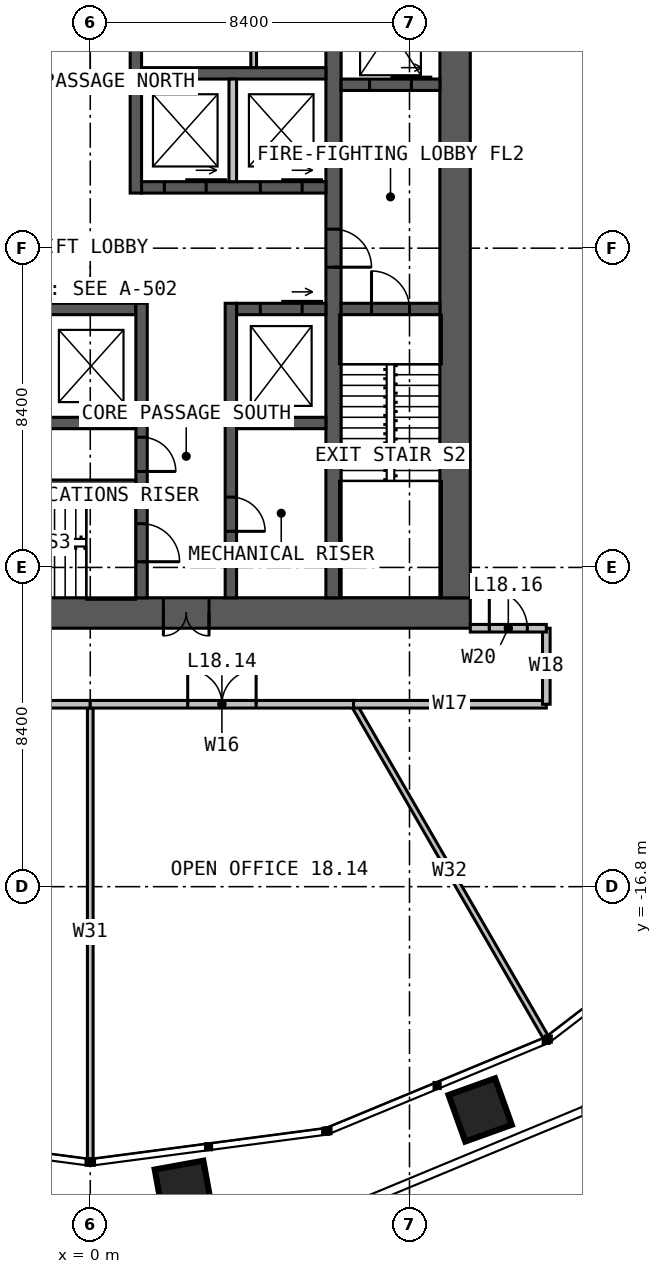
"""IFC4 building model, lengths in metres.
Left out: names, types, materials, properties, quantities, classifications, styles, units other than length and angle.
Written with IfcOpenShell. Run it as: python <this file> out.ifc"""

import sys

from ifc_helpers import new_model, si_unit, direction, frame, frame_2d, origin, place, context, subcontext, project, spatial, rectangle, extrude, element, fill, save


model = new_model("IFC4")
c1 = context("Model", 3, precision=1e-05, world=origin(), true_north=direction((0.0, 1.0)))
c2 = subcontext(c1, "Body", "Model", "MODEL_VIEW")
j1 = project(units=[si_unit("LENGTHUNIT", "METRE"), si_unit("PLANEANGLEUNIT", "RADIAN")], contexts=[c1])
p1 = place(None, origin())
s1 = spatial("IfcSite", under=j1, at=p1, CompositionType="ELEMENT")
p2 = place(p1, origin())
s2 = spatial("IfcBuilding", under=s1, at=p2, CompositionType="ELEMENT")
p3 = place(p2, frame((0.0, 0.0, 77.0)))
s3 = spatial("IfcBuildingStorey", under=s2, at=p3, CompositionType="ELEMENT", Elevation=77.0)
p4 = place(p3, frame((10.0, -9.6, 0.0), z_axis=(0.0, 0.0, 1.0), x_axis=(-1.0, 0.0, 0.0)))
e1 = element("IfcWall", 1, at=p4, inside=s3, PredefinedType="SOLIDWALL", context=c2, shape_type="SweptSolid", body=[
    extrude(rectangle(XDim=20.0, YDim=0.8, at=frame_2d((10.0, 0.0))), origin(), (0.0, 0.0, 1.0), 4.0),
])
p5 = place(p4, frame((6.875, 0.0, 0.0)))
e2 = element("IfcOpeningElement", 2, at=p5, cuts=e1, PredefinedType="OPENING", context=c2, shape_type="SweptSolid", body=[
    extrude(rectangle(XDim=1.2, YDim=2.2, at=frame_2d((0.6, 1.1))), frame((0.0, 0.41, 0.0), z_axis=(0.0, -1.0, 0.0), x_axis=(1.0, 0.0, 0.0)), (0.0, 0.0, 1.0), 0.82),
])
p6 = place(p3, frame((9.6, -9.2, 0.0), z_axis=(0.0, 0.0, 1.0), x_axis=(0.0, 1.0, 0.0)))
e3 = element("IfcWall", 3, at=p6, inside=s3, PredefinedType="SOLIDWALL", context=c2, shape_type="SweptSolid", body=[
    extrude(rectangle(XDim=18.4, YDim=0.8, at=frame_2d((9.2, 0.0))), origin(), (0.0, 0.0, 1.0), 4.0),
])
p7 = place(p3, frame((6.4, 9.2, 0.0), z_axis=(0.0, 0.0, 1.0), x_axis=(0.0, -1.0, 0.0)))
e4 = element("IfcWall", 4, at=p7, inside=s3, PredefinedType="SOLIDWALL", context=c2, shape_type="SweptSolid", body=[
    extrude(rectangle(XDim=18.4, YDim=0.4, at=frame_2d((9.2, 0.0))), origin(), (0.0, 0.0, 1.0), 4.0),
])
p8 = place(p7, frame((8.7, 0.0, 0.0)))
e5 = element("IfcOpeningElement", 5, at=p8, cuts=e4, PredefinedType="OPENING", context=c2, shape_type="SweptSolid", body=[
    extrude(rectangle(XDim=1.0, YDim=2.2, at=frame_2d((0.5, 1.1))), frame((0.0, 0.21, 0.0), z_axis=(0.0, -1.0, 0.0), x_axis=(1.0, 0.0, 0.0)), (0.0, 0.0, 1.0), 0.42),
])
p9 = place(p3, frame((1.35, 1.6, 0.0), z_axis=(0.0, 0.0, 1.0), x_axis=(1.0, 0.0, 0.0)))
e6 = element("IfcWall", 6, at=p9, inside=s3, PredefinedType="SOLIDWALL", context=c2, shape_type="SweptSolid", body=[
    extrude(rectangle(XDim=4.85, YDim=0.3, at=frame_2d((2.425, 0.0))), origin(), (0.0, 0.0, 1.0), 4.0),
])
p10 = place(p9, frame((0.6, 0.0, 0.0)))
e7 = element("IfcOpeningElement", 7, at=p10, cuts=e6, PredefinedType="OPENING", context=c2, shape_type="SweptSolid", body=[
    extrude(rectangle(XDim=1.1, YDim=2.2, at=frame_2d((0.55, 1.1))), frame((0.0, 0.16, 0.0), z_axis=(0.0, -1.0, 0.0), x_axis=(1.0, 0.0, 0.0)), (0.0, 0.0, 1.0), 0.32),
])
p11 = place(p9, frame((3.125, 0.0, 0.0)))
e8 = element("IfcOpeningElement", 8, at=p11, cuts=e6, PredefinedType="OPENING", context=c2, shape_type="SweptSolid", body=[
    extrude(rectangle(XDim=1.1, YDim=2.2, at=frame_2d((0.55, 1.1))), frame((0.0, 0.16, 0.0), z_axis=(0.0, -1.0, 0.0), x_axis=(1.0, 0.0, 0.0)), (0.0, 0.0, 1.0), 0.32),
])
p12 = place(p3, frame((1.35, 4.6, 0.0), z_axis=(0.0, 0.0, 1.0), x_axis=(1.0, 0.0, 0.0)))
e9 = element("IfcWall", 9, at=p12, inside=s3, PredefinedType="SOLIDWALL", context=c2, shape_type="SweptSolid", body=[
    extrude(rectangle(XDim=4.85, YDim=0.3, at=frame_2d((2.425, 0.0))), origin(), (0.0, 0.0, 1.0), 4.0),
])
p13 = place(p3, frame((1.2, 1.45, 0.0), z_axis=(0.0, 0.0, 1.0), x_axis=(0.0, 1.0, 0.0)))
e10 = element("IfcWall", 10, at=p13, inside=s3, PredefinedType="SOLIDWALL", context=c2, shape_type="SweptSolid", body=[
    extrude(rectangle(XDim=7.75, YDim=0.3, at=frame_2d((3.875, 0.0))), origin(), (0.0, 0.0, 1.0), 4.0),
])
p14 = place(p13, frame((3.8, 0.0, 0.0)))
e11 = element("IfcOpeningElement", 11, at=p14, cuts=e10, PredefinedType="OPENING", context=c2, shape_type="SweptSolid", body=[
    extrude(rectangle(XDim=1.0, YDim=2.2, at=frame_2d((0.5, 1.1))), frame((0.0, 0.16, 0.0), z_axis=(0.0, -1.0, 0.0), x_axis=(1.0, 0.0, 0.0)), (0.0, 0.0, 1.0), 0.32),
])
p15 = place(p13, frame((6.15, 0.0, 0.0)))
e12 = element("IfcOpeningElement", 12, at=p15, cuts=e10, PredefinedType="OPENING", context=c2, shape_type="SweptSolid", body=[
    extrude(rectangle(XDim=1.0, YDim=2.2, at=frame_2d((0.5, 1.1))), frame((0.0, 0.16, 0.0), z_axis=(0.0, -1.0, 0.0), x_axis=(1.0, 0.0, 0.0)), (0.0, 0.0, 1.0), 0.32),
])
p16 = place(p3, frame((-6.2, -1.6, 0.0), z_axis=(0.0, 0.0, 1.0), x_axis=(1.0, 0.0, 0.0)))
e13 = element("IfcWall", 13, at=p16, inside=s3, PredefinedType="SOLIDWALL", context=c2, shape_type="SweptSolid", body=[
    extrude(rectangle(XDim=7.4, YDim=0.3, at=frame_2d((3.7, 0.0))), origin(), (0.0, 0.0, 1.0), 4.0),
])
p17 = place(p3, frame((3.85, -1.6, 0.0), z_axis=(0.0, 0.0, 1.0), x_axis=(1.0, 0.0, 0.0)))
e14 = element("IfcWall", 14, at=p17, inside=s3, PredefinedType="SOLIDWALL", context=c2, shape_type="SweptSolid", body=[
    extrude(rectangle(XDim=2.35, YDim=0.3, at=frame_2d((1.175, 0.0))), origin(), (0.0, 0.0, 1.0), 4.0),
])
p18 = place(p17, frame((0.625, 0.0, 0.0)))
e15 = element("IfcOpeningElement", 15, at=p18, cuts=e14, PredefinedType="OPENING", context=c2, shape_type="SweptSolid", body=[
    extrude(rectangle(XDim=1.1, YDim=2.2, at=frame_2d((0.55, 1.1))), frame((0.0, 0.16, 0.0), z_axis=(0.0, -1.0, 0.0), x_axis=(1.0, 0.0, 0.0)), (0.0, 0.0, 1.0), 0.32),
])
p19 = place(p3, frame((-6.2, -4.6, 0.0), z_axis=(0.0, 0.0, 1.0), x_axis=(1.0, 0.0, 0.0)))
e16 = element("IfcWall", 16, at=p19, inside=s3, PredefinedType="SOLIDWALL", context=c2, shape_type="SweptSolid", body=[
    extrude(rectangle(XDim=7.4, YDim=0.3, at=frame_2d((3.7, 0.0))), origin(), (0.0, 0.0, 1.0), 4.0),
])
p20 = place(p3, frame((3.85, -4.6, 0.0), z_axis=(0.0, 0.0, 1.0), x_axis=(1.0, 0.0, 0.0)))
e17 = element("IfcWall", 17, at=p20, inside=s3, PredefinedType="SOLIDWALL", context=c2, shape_type="SweptSolid", body=[
    extrude(rectangle(XDim=2.35, YDim=0.3, at=frame_2d((1.175, 0.0))), origin(), (0.0, 0.0, 1.0), 4.0),
])
p21 = place(p3, frame((1.35, -1.45, 0.0), z_axis=(0.0, 0.0, 1.0), x_axis=(0.0, -1.0, 0.0)))
e18 = element("IfcWall", 18, at=p21, inside=s3, PredefinedType="SOLIDWALL", context=c2, shape_type="SweptSolid", body=[
    extrude(rectangle(XDim=7.75, YDim=0.3, at=frame_2d((3.875, 0.0))), origin(), (0.0, 0.0, 1.0), 4.0),
])
p22 = place(p21, frame((5.8, 0.0, 0.0)))
e19 = element("IfcOpeningElement", 19, at=p22, cuts=e18, PredefinedType="OPENING", context=c2, shape_type="SweptSolid", body=[
    extrude(rectangle(XDim=1.0, YDim=2.2, at=frame_2d((0.5, 1.1))), frame((0.0, 0.16, 0.0), z_axis=(0.0, -1.0, 0.0), x_axis=(1.0, 0.0, 0.0)), (0.0, 0.0, 1.0), 0.32),
])
p23 = place(p21, frame((3.525, 0.0, 0.0)))
e20 = element("IfcOpeningElement", 20, at=p23, cuts=e18, PredefinedType="OPENING", context=c2, shape_type="SweptSolid", body=[
    extrude(rectangle(XDim=0.9, YDim=2.2, at=frame_2d((0.45, 1.1))), frame((0.0, 0.16, 0.0), z_axis=(0.0, -1.0, 0.0), x_axis=(1.0, 0.0, 0.0)), (0.0, 0.0, 1.0), 0.32),
])
p24 = place(p3, frame((3.7, -1.45, 0.0), z_axis=(0.0, 0.0, 1.0), x_axis=(0.0, -1.0, 0.0)))
e21 = element("IfcWall", 21, at=p24, inside=s3, PredefinedType="SOLIDWALL", context=c2, shape_type="SweptSolid", body=[
    extrude(rectangle(XDim=7.75, YDim=0.3, at=frame_2d((3.875, 0.0))), origin(), (0.0, 0.0, 1.0), 4.0),
])
p25 = place(p24, frame((5.1, 0.0, 0.0)))
e22 = element("IfcOpeningElement", 22, at=p25, cuts=e21, PredefinedType="OPENING", context=c2, shape_type="SweptSolid", body=[
    extrude(rectangle(XDim=0.9, YDim=2.2, at=frame_2d((0.45, 1.1))), frame((0.0, 0.16, 0.0), z_axis=(0.0, -1.0, 0.0), x_axis=(1.0, 0.0, 0.0)), (0.0, 0.0, 1.0), 0.32),
])
p26 = place(p3, frame((-6.2, -6.2, 0.0), z_axis=(0.0, 0.0, 1.0), x_axis=(1.0, 0.0, 0.0)))
e23 = element("IfcWall", 23, at=p26, inside=s3, PredefinedType="SOLIDWALL", context=c2, shape_type="SweptSolid", body=[
    extrude(rectangle(XDim=7.4, YDim=0.2, at=frame_2d((3.7, 0.0))), origin(), (0.0, 0.0, 1.0), 4.0),
])
p27 = place(p3, frame((6.6, -1.6, 0.0), z_axis=(0.0, 0.0, 1.0), x_axis=(1.0, 0.0, 0.0)))
e24 = element("IfcWall", 24, at=p27, inside=s3, PredefinedType="SOLIDWALL", context=c2, shape_type="SweptSolid", body=[
    extrude(rectangle(XDim=2.6, YDim=0.3, at=frame_2d((1.3, 0.0))), origin(), (0.0, 0.0, 1.0), 4.0),
])
p28 = place(p27, frame((0.8, 0.0, 0.0)))
e25 = element("IfcOpeningElement", 25, at=p28, cuts=e24, PredefinedType="OPENING", context=c2, shape_type="SweptSolid", body=[
    extrude(rectangle(XDim=1.0, YDim=2.2, at=frame_2d((0.5, 1.1))), frame((0.0, 0.16, 0.0), z_axis=(0.0, -1.0, 0.0), x_axis=(1.0, 0.0, 0.0)), (0.0, 0.0, 1.0), 0.32),
])
p29 = place(p3, frame((6.6, 4.3, 0.0), z_axis=(0.0, 0.0, 1.0), x_axis=(1.0, 0.0, 0.0)))
e26 = element("IfcWall", 26, at=p29, inside=s3, PredefinedType="SOLIDWALL", context=c2, shape_type="SweptSolid", body=[
    extrude(rectangle(XDim=2.6, YDim=0.3, at=frame_2d((1.3, 0.0))), origin(), (0.0, 0.0, 1.0), 4.0),
])
p30 = place(p29, frame((0.75, 0.0, 0.0)))
e27 = element("IfcOpeningElement", 27, at=p30, cuts=e26, PredefinedType="OPENING", context=c2, shape_type="SweptSolid", body=[
    extrude(rectangle(XDim=1.1, YDim=2.2, at=frame_2d((0.55, 1.1))), frame((0.0, 0.16, 0.0), z_axis=(0.0, -1.0, 0.0), x_axis=(1.0, 0.0, 0.0)), (0.0, 0.0, 1.0), 0.32),
])
p31 = place(p3, frame((3.75, 1.75, 0.0), z_axis=(0.0, 0.0, 1.0), x_axis=(0.0, 1.0, 0.0)))
e28 = element("IfcWall", 28, at=p31, inside=s3, PredefinedType="SOLIDWALL", context=c2, shape_type="SweptSolid", body=[
    extrude(rectangle(XDim=2.7, YDim=0.2, at=frame_2d((1.35, 0.0))), origin(), (0.0, 0.0, 1.0), 3.75),
])
p32 = place(p3, frame((4.3, 4.75, 0.0), z_axis=(0.0, 0.0, 1.0), x_axis=(0.0, 1.0, 0.0)))
e29 = element("IfcWall", 29, at=p32, inside=s3, PredefinedType="PARTITIONING", context=c2, shape_type="SweptSolid", body=[
    extrude(rectangle(XDim=2.375, YDim=0.15, at=frame_2d((1.188, 0.0))), origin(), (0.0, 0.0, 1.0), 3.75),
])
p33 = place(p3, frame((0.0, -12.0, 0.0), z_axis=(0.0, 0.0, 1.0), x_axis=(0.0, -1.0, 0.0)))
e30 = element("IfcWall", 30, at=p33, inside=s3, PredefinedType="PARTITIONING", context=c2, shape_type="SweptSolid", body=[
    extrude(rectangle(XDim=11.962, YDim=0.15, at=frame_2d((5.981, 0.0))), origin(), (0.0, 0.0, 1.0), 2.79),
])
p34 = place(p3, frame((6.928, -12.0, 0.0), z_axis=(0.0, 0.0, 1.0), x_axis=(0.500002673408, -0.866023860286, 0.0)))
e31 = element("IfcWall", 31, at=p34, inside=s3, PredefinedType="PARTITIONING", context=c2, shape_type="SweptSolid", body=[
    extrude(rectangle(XDim=10.106, YDim=0.15, at=frame_2d((5.053, 0.0))), origin(), (0.0, 0.0, 1.0), 2.79),
])
p35 = place(p3, frame((-6.928, -12.0, 0.0), z_axis=(0.0, 0.0, 1.0), x_axis=(1.0, 0.0, 0.0)))
e32 = element("IfcWall", 32, at=p35, inside=s3, PredefinedType="PARTITIONING", context=c2, shape_type="SweptSolid", body=[
    extrude(rectangle(XDim=6.928, YDim=0.2, at=frame_2d((3.464, 0.0))), origin(), (0.0, 0.0, 1.0), 3.8),
])
p36 = place(p35, frame((2.964, 0.0, 0.0)))
e33 = element("IfcOpeningElement", 33, at=p36, cuts=e32, PredefinedType="OPENING", context=c2, shape_type="SweptSolid", body=[
    extrude(rectangle(XDim=1.0, YDim=2.2, at=frame_2d((0.5, 1.1))), frame((0.0, 0.11, 0.0), z_axis=(0.0, -1.0, 0.0), x_axis=(1.0, 0.0, 0.0)), (0.0, 0.0, 1.0), 0.22),
])
p37 = place(p3, frame((0.0, -12.0, 0.0), z_axis=(0.0, 0.0, 1.0), x_axis=(1.0, 0.0, 0.0)))
e34 = element("IfcWall", 34, at=p37, inside=s3, PredefinedType="PARTITIONING", context=c2, shape_type="SweptSolid", body=[
    extrude(rectangle(XDim=6.928, YDim=0.2, at=frame_2d((3.464, 0.0))), origin(), (0.0, 0.0, 1.0), 3.8),
])
p38 = place(p37, frame((2.564, 0.0, 0.0)))
e35 = element("IfcOpeningElement", 35, at=p38, cuts=e34, PredefinedType="OPENING", context=c2, shape_type="SweptSolid", body=[
    extrude(rectangle(XDim=1.8, YDim=2.2, at=frame_2d((0.9, 1.1))), frame((0.0, 0.11, 0.0), z_axis=(0.0, -1.0, 0.0), x_axis=(1.0, 0.0, 0.0)), (0.0, 0.0, 1.0), 0.22),
])
p39 = place(p3, frame((6.928, -12.0, 0.0), z_axis=(0.0, 0.0, 1.0), x_axis=(1.0, 0.0, 0.0)))
e36 = element("IfcWall", 36, at=p39, inside=s3, PredefinedType="PARTITIONING", context=c2, shape_type="SweptSolid", body=[
    extrude(rectangle(XDim=5.072, YDim=0.2, at=frame_2d((2.536, 0.0))), origin(), (0.0, 0.0, 1.0), 3.8),
])
p40 = place(p3, frame((12.0, -12.0, 0.0), z_axis=(0.0, 0.0, 1.0), x_axis=(0.0, 1.0, 0.0)))
e37 = element("IfcWall", 37, at=p40, inside=s3, PredefinedType="PARTITIONING", context=c2, shape_type="SweptSolid", body=[
    extrude(rectangle(XDim=2.0, YDim=0.2, at=frame_2d((1.0, 0.0))), origin(), (0.0, 0.0, 1.0), 3.8),
])
p41 = place(p3, frame((10.0, -10.0, 0.0), z_axis=(0.0, 0.0, 1.0), x_axis=(1.0, 0.0, 0.0)))
e38 = element("IfcWall", 38, at=p41, inside=s3, PredefinedType="PARTITIONING", context=c2, shape_type="SweptSolid", body=[
    extrude(rectangle(XDim=2.0, YDim=0.2, at=frame_2d((1.0, 0.0))), origin(), (0.0, 0.0, 1.0), 3.8),
])
p42 = place(p41, frame((0.5, 0.0, 0.0)))
e39 = element("IfcOpeningElement", 39, at=p42, cuts=e38, PredefinedType="OPENING", context=c2, shape_type="SweptSolid", body=[
    extrude(rectangle(XDim=1.0, YDim=2.2, at=frame_2d((0.5, 1.1))), frame((0.0, 0.11, 0.0), z_axis=(0.0, -1.0, 0.0), x_axis=(1.0, 0.0, 0.0)), (0.0, 0.0, 1.0), 0.22),
])
p43 = place(p5, origin())
e40 = element("IfcDoor", 40, at=p43, inside=s3, OperationType="DOUBLE_DOOR_SINGLE_SWING", PredefinedType="DOOR", context=c2, shape_type="SweptSolid", body=[
    extrude(rectangle(XDim=1.2, YDim=2.2, at=frame_2d((0.6, 1.1))), frame((0.0, 0.025, 0.0), z_axis=(0.0, -1.0, 0.0), x_axis=(1.0, 0.0, 0.0)), (0.0, 0.0, 1.0), 0.05),
])
fill(e2, e40)
p44 = place(p8, origin())
e41 = element("IfcDoor", 41, at=p44, inside=s3, OperationType="SINGLE_SWING_RIGHT", PredefinedType="DOOR", context=c2, shape_type="SweptSolid", body=[
    extrude(rectangle(XDim=1.0, YDim=2.2, at=frame_2d((0.5, 1.1))), frame((0.0, 0.025, 0.0), z_axis=(0.0, -1.0, 0.0), x_axis=(1.0, 0.0, 0.0)), (0.0, 0.0, 1.0), 0.05),
])
fill(e5, e41)
p45 = place(p28, origin())
e42 = element("IfcDoor", 42, at=p45, inside=s3, OperationType="SINGLE_SWING_LEFT", PredefinedType="DOOR", context=c2, shape_type="SweptSolid", body=[
    extrude(rectangle(XDim=1.0, YDim=2.2, at=frame_2d((0.5, 1.1))), frame((0.0, 0.025, 0.0), z_axis=(0.0, -1.0, 0.0), x_axis=(1.0, 0.0, 0.0)), (0.0, 0.0, 1.0), 0.05),
])
fill(e25, e42)
p46 = place(p22, origin())
e43 = element("IfcDoor", 43, at=p46, inside=s3, OperationType="SINGLE_SWING_RIGHT", PredefinedType="DOOR", context=c2, shape_type="SweptSolid", body=[
    extrude(rectangle(XDim=1.0, YDim=2.2, at=frame_2d((0.5, 1.1))), frame((0.0, 0.025, 0.0), z_axis=(0.0, -1.0, 0.0), x_axis=(1.0, 0.0, 0.0)), (0.0, 0.0, 1.0), 0.05),
])
fill(e19, e43)
p47 = place(p23, origin())
e44 = element("IfcDoor", 44, at=p47, inside=s3, OperationType="SINGLE_SWING_RIGHT", PredefinedType="DOOR", context=c2, shape_type="SweptSolid", body=[
    extrude(rectangle(XDim=0.9, YDim=2.2, at=frame_2d((0.45, 1.1))), frame((0.0, 0.025, 0.0), z_axis=(0.0, -1.0, 0.0), x_axis=(1.0, 0.0, 0.0)), (0.0, 0.0, 1.0), 0.05),
])
fill(e20, e44)
p48 = place(p25, origin())
e45 = element("IfcDoor", 45, at=p48, inside=s3, OperationType="SINGLE_SWING_RIGHT", PredefinedType="DOOR", context=c2, shape_type="SweptSolid", body=[
    extrude(rectangle(XDim=0.9, YDim=2.2, at=frame_2d((0.45, 1.1))), frame((0.0, 0.025, 0.0), z_axis=(0.0, -1.0, 0.0), x_axis=(1.0, 0.0, 0.0)), (0.0, 0.0, 1.0), 0.05),
])
fill(e22, e45)
p49 = place(p10, origin())
e46 = element("IfcDoor", 46, at=p49, inside=s3, OperationType="SLIDING_TO_LEFT", PredefinedType="DOOR", context=c2, shape_type="SweptSolid", body=[
    extrude(rectangle(XDim=1.1, YDim=2.2, at=frame_2d((0.55, 1.1))), frame((0.0, 0.025, 0.0), z_axis=(0.0, -1.0, 0.0), x_axis=(1.0, 0.0, 0.0)), (0.0, 0.0, 1.0), 0.05),
])
fill(e7, e46)
p50 = place(p11, origin())
e47 = element("IfcDoor", 47, at=p50, inside=s3, OperationType="SLIDING_TO_LEFT", PredefinedType="DOOR", context=c2, shape_type="SweptSolid", body=[
    extrude(rectangle(XDim=1.1, YDim=2.2, at=frame_2d((0.55, 1.1))), frame((0.0, 0.025, 0.0), z_axis=(0.0, -1.0, 0.0), x_axis=(1.0, 0.0, 0.0)), (0.0, 0.0, 1.0), 0.05),
])
fill(e8, e47)
p51 = place(p18, origin())
e48 = element("IfcDoor", 48, at=p51, inside=s3, OperationType="SLIDING_TO_LEFT", PredefinedType="DOOR", context=c2, shape_type="SweptSolid", body=[
    extrude(rectangle(XDim=1.1, YDim=2.2, at=frame_2d((0.55, 1.1))), frame((0.0, 0.025, 0.0), z_axis=(0.0, -1.0, 0.0), x_axis=(1.0, 0.0, 0.0)), (0.0, 0.0, 1.0), 0.05),
])
fill(e15, e48)
p52 = place(p30, origin())
e49 = element("IfcDoor", 49, at=p52, inside=s3, OperationType="SLIDING_TO_LEFT", PredefinedType="DOOR", context=c2, shape_type="SweptSolid", body=[
    extrude(rectangle(XDim=1.1, YDim=2.2, at=frame_2d((0.55, 1.1))), frame((0.0, 0.025, 0.0), z_axis=(0.0, -1.0, 0.0), x_axis=(1.0, 0.0, 0.0)), (0.0, 0.0, 1.0), 0.05),
])
fill(e27, e49)
p53 = place(p38, origin())
e50 = element("IfcDoor", 50, at=p53, inside=s3, OperationType="DOUBLE_DOOR_SINGLE_SWING", PredefinedType="DOOR", context=c2, shape_type="SweptSolid", body=[
    extrude(rectangle(XDim=1.8, YDim=2.2, at=frame_2d((0.9, 1.1))), frame((0.0, 0.025, 0.0), z_axis=(0.0, -1.0, 0.0), x_axis=(1.0, 0.0, 0.0)), (0.0, 0.0, 1.0), 0.05),
])
fill(e35, e50)
p54 = place(p42, origin())
e51 = element("IfcDoor", 51, at=p54, inside=s3, OperationType="SINGLE_SWING_LEFT", PredefinedType="DOOR", context=c2, shape_type="SweptSolid", body=[
    extrude(rectangle(XDim=1.0, YDim=2.2, at=frame_2d((0.5, 1.1))), frame((0.0, 0.025, 0.0), z_axis=(0.0, -1.0, 0.0), x_axis=(1.0, 0.0, 0.0)), (0.0, 0.0, 1.0), 0.05),
])
fill(e39, e51)
save(model, sys.argv[1])
